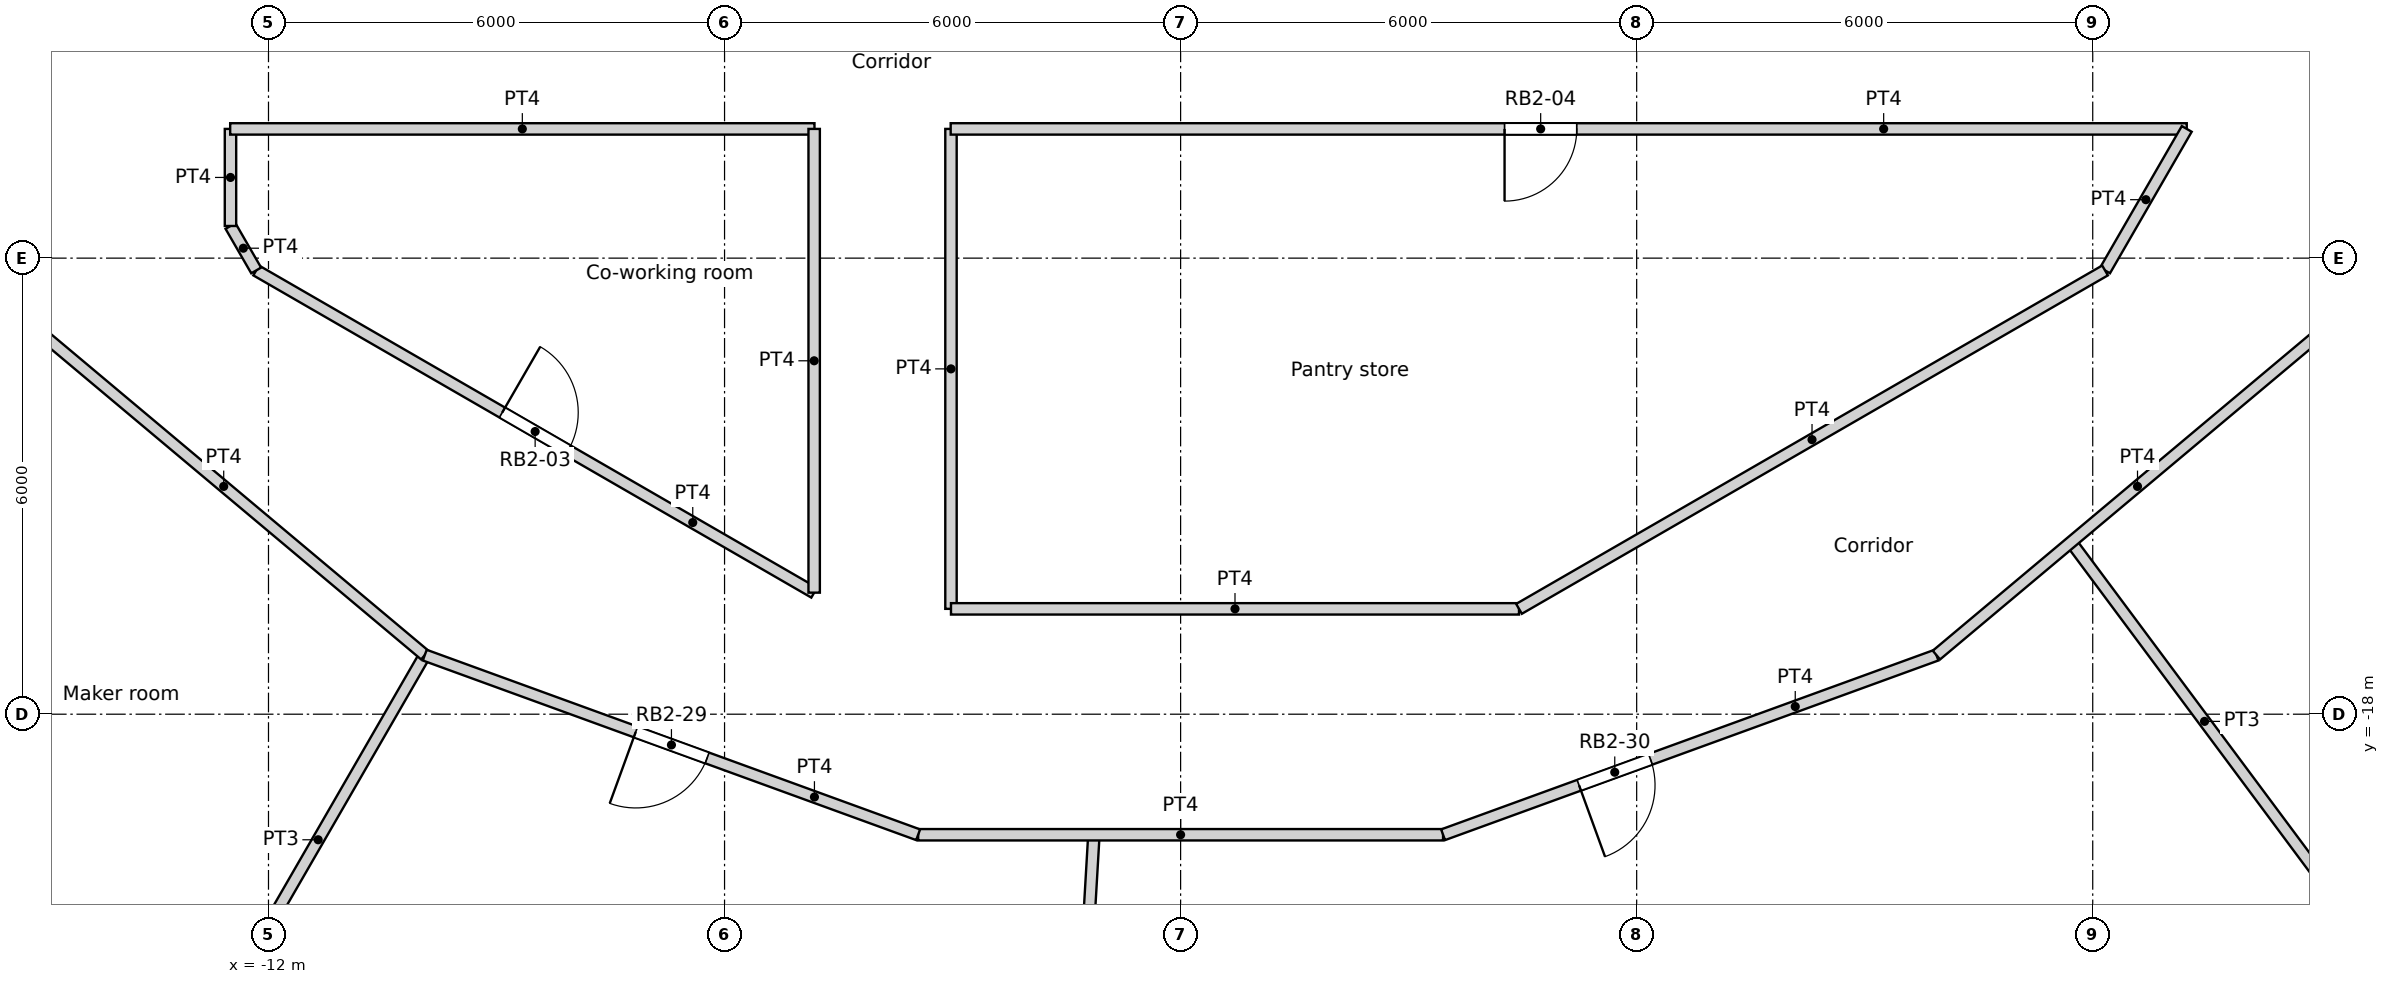
"""IFC4 building model, lengths in metres.
Left out: names, types, materials, properties, quantities, classifications, styles, units other than length and angle.
Written with IfcOpenShell. Run it as: python <this file> out.ifc"""

import sys

from ifc_helpers import new_model, si_unit, direction, frame, frame_2d, origin, origin_2d, place, context, subcontext, project, spatial, rectangle, circle, extrude, element, fill, save


model = new_model("IFC4")
c1 = context("Model", 3, precision=1e-05, world=origin(), true_north=direction((0.0, 1.0)))
c2 = subcontext(c1, "Body", "Model", "MODEL_VIEW")
j1 = project(units=[si_unit("LENGTHUNIT", "METRE"), si_unit("PLANEANGLEUNIT", "RADIAN")], contexts=[c1])
p1 = place(None, origin())
s1 = spatial("IfcSite", under=j1, at=p1, CompositionType="ELEMENT")
p2 = place(p1, origin())
s2 = spatial("IfcBuilding", under=s1, at=p2, CompositionType="ELEMENT")
p3 = place(p2, frame((0.0, 0.0, 136.8)))
s3 = spatial("IfcBuildingStorey", under=s2, at=p3, CompositionType="ELEMENT", Elevation=136.8)
p4 = place(p3, frame((14.659, -19.69, 0.0), z_axis=(0.0, 0.0, 1.0), x_axis=(1.0, 0.0, 0.0)))
e1 = element("IfcColumn", 1, at=p4, inside=s3, PredefinedType="COLUMN", context=c2, shape_type="SweptSolid", body=[
    extrude(circle(Radius=0.6, at=origin_2d()), origin(), (0.0, 0.0, 1.0), 3.6),
])
for number, where, z_axis, x_axis in (
    (2, (-13.798, -12.802, 0.0), (0.0, 0.0, 1.0), (1.0, 0.0, 0.0)),
    (3, (-9.411, -16.301, 0.0), (0.0, 0.0, 1.0), (1.0, 0.0, 0.0)),
    (4, (-4.188, -18.35, 0.0), (0.0, 0.0, 1.0), (1.0, 0.0, 0.0)),
    (5, (1.406, -18.77, 0.0), (0.0, 0.0, 1.0), (1.0, 0.0, 0.0)),
    (6, (6.876, -17.521, 0.0), (0.0, 0.0, 1.0), (1.0, 0.0, 0.0)),
    (7, (11.735, -14.716, 0.0), (0.0, 0.0, 1.0), (1.0, 0.0, 0.0)),
):
    element("IfcColumn", number, at=place(p3, frame(where, z_axis=z_axis, x_axis=x_axis)), inside=s3, PredefinedType="COLUMN", context=c2, shape_type="SweptSolid", body=[
        extrude(circle(Radius=0.65, at=origin_2d()), origin(), (0.0, 0.0, 1.0), 3.6),
    ])
p5 = place(p3, frame((-15.639, -21.048, -0.3), z_axis=(0.0, 0.0, 1.0), x_axis=(0.835514416706, -0.549468524554, 0.0)))
e8 = element("IfcWall", 8, at=p5, inside=s3, PredefinedType="ELEMENTEDWALL", context=c2, shape_type="SweptSolid", body=[
    extrude(rectangle(XDim=3.0, YDim=1.45, at=frame_2d((1.5, 0.0))), origin(), (0.0, 0.0, 1.0), 3.6),
])
p6 = place(p5, frame((1.5, 0.0, 1.85)))
e9 = element("IfcOpeningElement", 9, at=p6, cuts=e8, PredefinedType="OPENING", context=c2, shape_type="SweptSolid", body=[
    extrude(circle(Radius=0.9, at=origin_2d()), frame((0.0, 0.735, 0.0), z_axis=(0.0, -1.0, 0.0), x_axis=(1.0, 0.0, 0.0)), (0.0, 0.0, 1.0), 1.47),
])
p7 = place(p3, frame((12.832, -22.206, 0.0), z_axis=(0.0, 0.0, 1.0), x_axis=(0.835508361394, 0.54947773207, 0.0)))
e10 = element("IfcWall", 10, at=p7, inside=s3, PredefinedType="SOLIDWALL", context=c2, shape_type="SweptSolid", body=[
    extrude(rectangle(XDim=2.973, YDim=0.3, at=frame_2d((1.486, 0.0))), origin(), (0.0, 0.0, 1.0), 2.8),
])
p8 = place(p7, frame((1.486, 0.0, 1.55)))
e11 = element("IfcOpeningElement", 11, at=p8, cuts=e10, PredefinedType="OPENING", context=c2, shape_type="SweptSolid", body=[
    extrude(circle(Radius=0.9, at=origin_2d()), frame((0.0, 0.16, 0.0), z_axis=(0.0, -1.0, 0.0), x_axis=(1.0, 0.0, 0.0)), (0.0, 0.0, 1.0), 0.32),
])
p9 = place(p3, frame((-12.504, -10.3, 0.0), z_axis=(0.0, 0.0, 1.0), x_axis=(1.0, 0.0, 0.0)))
e12 = element("IfcWall", 12, at=p9, inside=s3, PredefinedType="PARTITIONING", context=c2, shape_type="SweptSolid", body=[
    extrude(rectangle(XDim=7.687, YDim=0.15, at=frame_2d((3.844, 0.0))), origin(), (0.0, 0.0, 1.0), 3.3),
])
p10 = place(p3, frame((-3.025, -10.3, 0.0), z_axis=(0.0, 0.0, 1.0), x_axis=(1.0, 0.0, 0.0)))
e13 = element("IfcWall", 13, at=p10, inside=s3, PredefinedType="PARTITIONING", context=c2, shape_type="SweptSolid", body=[
    extrude(rectangle(XDim=16.262, YDim=0.15, at=frame_2d((8.131, 0.0))), origin(), (0.0, 0.0, 1.0), 3.3),
])
p11 = place(p10, frame((7.287, 0.0, 0.0)))
e14 = element("IfcOpeningElement", 14, at=p11, cuts=e13, PredefinedType="OPENING", context=c2, shape_type="SweptSolid", body=[
    extrude(rectangle(XDim=0.95, YDim=2.1, at=frame_2d((0.475, 1.05))), frame((0.0, 0.075, 0.0), z_axis=(0.0, -1.0, 0.0), x_axis=(1.0, 0.0, 0.0)), (0.0, 0.0, 1.0), 0.15),
])
p12 = place(p3, frame((12.162, -12.162, 0.0), z_axis=(0.0, 0.0, 1.0), x_axis=(0.499961633463, 0.866047553582, 0.0)))
e15 = element("IfcWall", 15, at=p12, inside=s3, PredefinedType="PARTITIONING", context=c2, shape_type="SweptSolid", body=[
    extrude(rectangle(XDim=2.15, YDim=0.15, at=frame_2d((1.075, 0.0))), origin(), (0.0, 0.0, 1.0), 3.3),
])
p13 = place(p3, frame((9.943, -17.222, 0.0), z_axis=(0.0, 0.0, 1.0), x_axis=(0.766192104565, 0.642611592567, 0.0)))
e16 = element("IfcWall", 16, at=p13, inside=s3, PredefinedType="PARTITIONING", context=c2, shape_type="SweptSolid", body=[
    extrude(rectangle(XDim=6.906, YDim=0.15, at=frame_2d((3.453, 0.0))), origin(), (0.0, 0.0, 1.0), 3.3),
])
p14 = place(p3, frame((-12.5, -11.577, 0.0), z_axis=(0.0, 0.0, 1.0), x_axis=(0.0, 1.0, 0.0)))
e17 = element("IfcWall", 17, at=p14, inside=s3, PredefinedType="PARTITIONING", context=c2, shape_type="SweptSolid", body=[
    extrude(rectangle(XDim=1.277, YDim=0.15, at=frame_2d((0.638, 0.0))), origin(), (0.0, 0.0, 1.0), 3.3),
])
p15 = place(p3, frame((-12.5, -11.577, 0.0), z_axis=(0.0, 0.0, 1.0), x_axis=(0.500024767483, -0.866011103799, 0.0)))
e18 = element("IfcWall", 18, at=p15, inside=s3, PredefinedType="PARTITIONING", context=c2, shape_type="SweptSolid", body=[
    extrude(rectangle(XDim=0.676, YDim=0.15, at=frame_2d((0.338, 0.0))), origin(), (0.0, 0.0, 1.0), 3.3),
])
p16 = place(p3, frame((-15.235, -12.784, 0.0), z_axis=(0.0, 0.0, 1.0), x_axis=(0.766192104565, -0.642611592567, 0.0)))
e19 = element("IfcWall", 19, at=p16, inside=s3, PredefinedType="PARTITIONING", context=c2, shape_type="SweptSolid", body=[
    extrude(rectangle(XDim=6.906, YDim=0.15, at=frame_2d((3.453, 0.0))), origin(), (0.0, 0.0, 1.0), 3.3),
])
p17 = place(p3, frame((-12.162, -12.162, 0.0), z_axis=(0.0, 0.0, 1.0), x_axis=(0.866004766557, -0.500035743023, 0.0)))
e20 = element("IfcWall", 20, at=p17, inside=s3, PredefinedType="PARTITIONING", context=c2, shape_type="SweptSolid", body=[
    extrude(rectangle(XDim=8.477, YDim=0.15, at=frame_2d((4.239, 0.0))), origin(), (0.0, 0.0, 1.0), 3.3),
])
p18 = place(p17, frame((3.738, 0.0, 0.0)))
e21 = element("IfcOpeningElement", 21, at=p18, cuts=e20, PredefinedType="OPENING", context=c2, shape_type="SweptSolid", body=[
    extrude(rectangle(XDim=1.0, YDim=2.04, at=frame_2d((0.5, 1.02))), frame((0.0, 0.075, 0.0), z_axis=(0.0, -1.0, 0.0), x_axis=(1.0, 0.0, 0.0)), (0.0, 0.0, 1.0), 0.15),
])
p19 = place(p3, frame((-4.821, -16.401, 0.0), z_axis=(0.0, 0.0, 1.0), x_axis=(0.0, 1.0, 0.0)))
e22 = element("IfcWall", 22, at=p19, inside=s3, PredefinedType="PARTITIONING", context=c2, shape_type="SweptSolid", body=[
    extrude(rectangle(XDim=6.101, YDim=0.15, at=frame_2d((3.05, 0.0))), origin(), (0.0, 0.0, 1.0), 3.3),
])
p20 = place(p3, frame((-3.021, -16.614, 0.0), z_axis=(0.0, 0.0, 1.0), x_axis=(0.0, 1.0, 0.0)))
e23 = element("IfcWall", 23, at=p20, inside=s3, PredefinedType="PARTITIONING", context=c2, shape_type="SweptSolid", body=[
    extrude(rectangle(XDim=6.314, YDim=0.15, at=frame_2d((3.157, 0.0))), origin(), (0.0, 0.0, 1.0), 3.3),
])
p21 = place(p3, frame((-3.021, -16.614, 0.0), z_axis=(0.0, 0.0, 1.0), x_axis=(1.0, 0.0, 0.0)))
e24 = element("IfcWall", 24, at=p21, inside=s3, PredefinedType="PARTITIONING", context=c2, shape_type="SweptSolid", body=[
    extrude(rectangle(XDim=7.473, YDim=0.15, at=frame_2d((3.736, 0.0))), origin(), (0.0, 0.0, 1.0), 3.3),
])
p22 = place(p3, frame((4.452, -16.614, 0.0), z_axis=(0.0, 0.0, 1.0), x_axis=(0.866005203721, 0.500034985904, 0.0)))
e25 = element("IfcWall", 25, at=p22, inside=s3, PredefinedType="PARTITIONING", context=c2, shape_type="SweptSolid", body=[
    extrude(rectangle(XDim=8.903, YDim=0.15, at=frame_2d((4.452, 0.0))), origin(), (0.0, 0.0, 1.0), 3.3),
])
p23 = place(p3, frame((-3.453, -19.586, 0.0), z_axis=(0.0, 0.0, 1.0), x_axis=(1.0, 0.0, 0.0)))
e26 = element("IfcWall", 26, at=p23, inside=s3, PredefinedType="PARTITIONING", context=c2, shape_type="SweptSolid", body=[
    extrude(rectangle(XDim=6.906, YDim=0.15, at=frame_2d((3.453, 0.0))), origin(), (0.0, 0.0, 1.0), 3.3),
])
p24 = place(p3, frame((-9.944, -17.223, 0.0), z_axis=(0.0, 0.0, 1.0), x_axis=(0.939672634566, -0.342075050021, 0.0)))
e27 = element("IfcWall", 27, at=p24, inside=s3, PredefinedType="PARTITIONING", context=c2, shape_type="SweptSolid", body=[
    extrude(rectangle(XDim=6.908, YDim=0.15, at=frame_2d((3.454, 0.0))), origin(), (0.0, 0.0, 1.0), 3.3),
])
p25 = place(p24, frame((2.954, 0.0, 0.0)))
e28 = element("IfcOpeningElement", 28, at=p25, cuts=e27, PredefinedType="OPENING", context=c2, shape_type="SweptSolid", body=[
    extrude(rectangle(XDim=1.0, YDim=2.04, at=frame_2d((0.5, 1.02))), frame((0.0, 0.075, 0.0), z_axis=(0.0, -1.0, 0.0), x_axis=(1.0, 0.0, 0.0)), (0.0, 0.0, 1.0), 0.15),
])
p26 = place(p3, frame((3.453, -19.586, 0.0), z_axis=(0.0, 0.0, 1.0), x_axis=(0.939672634566, 0.342075050021, 0.0)))
e29 = element("IfcWall", 29, at=p26, inside=s3, PredefinedType="PARTITIONING", context=c2, shape_type="SweptSolid", body=[
    extrude(rectangle(XDim=6.908, YDim=0.15, at=frame_2d((3.454, 0.0))), origin(), (0.0, 0.0, 1.0), 3.3),
])
p27 = place(p26, frame((1.904, 0.0, 0.0)))
e30 = element("IfcOpeningElement", 30, at=p27, cuts=e29, PredefinedType="OPENING", context=c2, shape_type="SweptSolid", body=[
    extrude(rectangle(XDim=1.0, YDim=2.04, at=frame_2d((0.5, 1.02))), frame((0.0, 0.075, 0.0), z_axis=(0.0, -1.0, 0.0), x_axis=(1.0, 0.0, 0.0)), (0.0, 0.0, 1.0), 0.15),
])
p28 = place(p3, frame((-12.749, -22.081, 0.0), z_axis=(0.0, 0.0, 1.0), x_axis=(0.500010020406, 0.866019618423, 0.0)))
e31 = element("IfcWall", 31, at=p28, inside=s3, PredefinedType="PARTITIONING", context=c2, shape_type="SweptSolid", body=[
    extrude(rectangle(XDim=5.61, YDim=0.15, at=frame_2d((2.805, 0.0))), origin(), (0.0, 0.0, 1.0), 3.3),
])
p29 = place(p3, frame((-1.483, -25.454, 0.0), z_axis=(0.0, 0.0, 1.0), x_axis=(0.058147412668, 0.998308007781, 0.0)))
e32 = element("IfcWall", 32, at=p29, inside=s3, PredefinedType="PARTITIONING", context=c2, shape_type="SweptSolid", body=[
    extrude(rectangle(XDim=5.878, YDim=0.15, at=frame_2d((2.939, 0.0))), origin(), (0.0, 0.0, 1.0), 3.3),
])
p30 = place(p3, frame((11.716, -15.737, 0.0), z_axis=(0.0, 0.0, 1.0), x_axis=(0.597151875745, -0.802128192557, 0.0)))
e33 = element("IfcWall", 33, at=p30, inside=s3, PredefinedType="PARTITIONING", context=c2, shape_type="SweptSolid", body=[
    extrude(rectangle(XDim=5.878, YDim=0.15, at=frame_2d((2.939, 0.0))), origin(), (0.0, 0.0, 1.0), 3.3),
])
p31 = place(p18, origin())
e34 = element("IfcDoor", 34, at=p31, inside=s3, OperationType="SINGLE_SWING_LEFT", PredefinedType="DOOR", context=c2, shape_type="SweptSolid", body=[
    extrude(rectangle(XDim=1.0, YDim=2.04, at=frame_2d((0.5, 1.02))), frame((0.0, 0.025, 0.0), z_axis=(0.0, -1.0, 0.0), x_axis=(1.0, 0.0, 0.0)), (0.0, 0.0, 1.0), 0.05),
])
fill(e21, e34)
p32 = place(p11, origin())
e35 = element("IfcDoor", 35, at=p32, inside=s3, OperationType="SINGLE_SWING_RIGHT", PredefinedType="DOOR", context=c2, shape_type="SweptSolid", body=[
    extrude(rectangle(XDim=0.95, YDim=2.1, at=frame_2d((0.475, 1.05))), frame((0.0, 0.025, 0.0), z_axis=(0.0, -1.0, 0.0), x_axis=(1.0, 0.0, 0.0)), (0.0, 0.0, 1.0), 0.05),
])
fill(e14, e35)
p33 = place(p25, origin())
e36 = element("IfcDoor", 36, at=p33, inside=s3, OperationType="SINGLE_SWING_RIGHT", PredefinedType="DOOR", context=c2, shape_type="SweptSolid", body=[
    extrude(rectangle(XDim=1.0, YDim=2.04, at=frame_2d((0.5, 1.02))), frame((0.0, 0.025, 0.0), z_axis=(0.0, -1.0, 0.0), x_axis=(1.0, 0.0, 0.0)), (0.0, 0.0, 1.0), 0.05),
])
fill(e28, e36)
p34 = place(p27, origin())
e37 = element("IfcDoor", 37, at=p34, inside=s3, OperationType="SINGLE_SWING_RIGHT", PredefinedType="DOOR", context=c2, shape_type="SweptSolid", body=[
    extrude(rectangle(XDim=1.0, YDim=2.04, at=frame_2d((0.5, 1.02))), frame((0.0, 0.025, 0.0), z_axis=(0.0, -1.0, 0.0), x_axis=(1.0, 0.0, 0.0)), (0.0, 0.0, 1.0), 0.05),
])
fill(e30, e37)
save(model, sys.argv[1])
